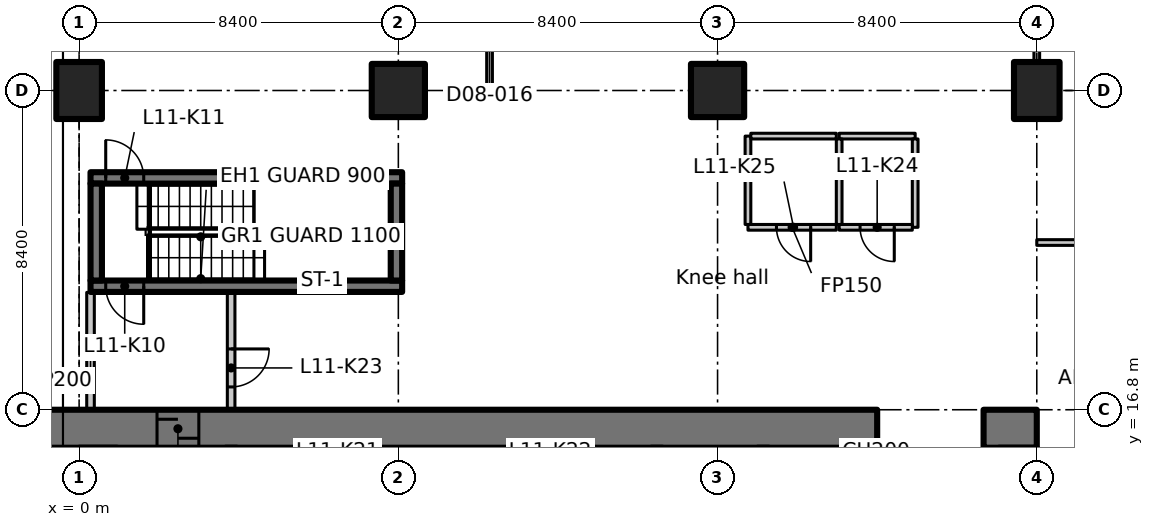
"""IFC4 building model, lengths in metres.
Left out: names, types, materials, properties, quantities, classifications, styles, units other than length and angle.
Written with IfcOpenShell. Run it as: python <this file> out.ifc"""

import sys

from ifc_helpers import new_model, si_unit, direction, frame, frame_2d, origin, origin_2d, place, context, subcontext, project, spatial, polyline, rectangle, outline, extrude, element, fill, save


model = new_model("IFC4")
c1 = context("Model", 3, precision=1e-05, world=origin(), true_north=direction((0.0, 1.0)))
c2 = subcontext(c1, "Body", "Model", "MODEL_VIEW")
j1 = project(units=[si_unit("LENGTHUNIT", "METRE"), si_unit("PLANEANGLEUNIT", "RADIAN")], contexts=[c1])
p1 = place(None, origin())
s1 = spatial("IfcSite", under=j1, at=p1, CompositionType="ELEMENT")
p2 = place(p1, origin())
s2 = spatial("IfcBuilding", under=s1, at=p2, CompositionType="ELEMENT")
p3 = place(p2, frame((0.0, 0.0, 54.5)))
s3 = spatial("IfcBuildingStorey", under=s2, at=p3, CompositionType="ELEMENT", Elevation=54.5)
p4 = place(p3, frame((0.0, 25.2, 0.0), z_axis=(0.0, 0.0, 1.0), x_axis=(1.0, 0.0, 0.0)))
e1 = element("IfcColumn", 1, at=p4, inside=s3, PredefinedType="COLUMN", context=c2, shape_type="SweptSolid", body=[
    extrude(rectangle(XDim=1.2, YDim=1.5, at=origin_2d()), origin(), (0.0, 0.0, 1.0), 3.35),
])
for number, where, z_axis, x_axis in (
    (2, (8.4, 25.2, 0.0), (0.0, 0.0, 1.0), (1.0, 0.0, 0.0)),
    (3, (16.8, 25.2, 0.0), (0.0, 0.0, 1.0), (1.0, 0.0, 0.0)),
):
    element("IfcColumn", number, at=place(p3, frame(where, z_axis=z_axis, x_axis=x_axis)), inside=s3, PredefinedType="COLUMN", context=c2, shape_type="SweptSolid", body=[
        extrude(rectangle(XDim=1.4, YDim=1.4, at=origin_2d()), origin(), (0.0, 0.0, 1.0), 3.35),
    ])
p5 = place(p3, frame((25.2, 25.2, 0.0), z_axis=(0.0, 0.0, 1.0), x_axis=(1.0, 0.0, 0.0)))
e4 = element("IfcColumn", 4, at=p5, inside=s3, PredefinedType="COLUMN", context=c2, shape_type="SweptSolid", body=[
    extrude(rectangle(XDim=1.2, YDim=1.5, at=origin_2d()), origin(), (0.0, 0.0, 1.0), 3.35),
])
p6 = place(p3, frame((-1.1, 16.3, 0.0), z_axis=(0.0, 0.0, 1.0), x_axis=(1.0, 0.0, 0.0)))
e5 = element("IfcWall", 5, at=p6, inside=s3, PredefinedType="SHEAR", context=c2, shape_type="SweptSolid", body=[
    extrude(rectangle(XDim=22.1, YDim=1.0, at=frame_2d((11.05, 0.0))), origin(), (0.0, 0.0, 1.0), 3.35),
])
p7 = place(p6, frame((3.15, 0.0, 0.0)))
e6 = element("IfcOpeningElement", 6, at=p7, cuts=e5, PredefinedType="OPENING", context=c2, shape_type="SweptSolid", body=[
    extrude(rectangle(XDim=1.1, YDim=2.3, at=frame_2d((0.55, 1.15))), frame((0.0, 0.51, 0.0), z_axis=(0.0, -1.0, 0.0), x_axis=(1.0, 0.0, 0.0)), (0.0, 0.0, 1.0), 1.02),
])
p8 = place(p3, frame((23.8, 16.3, 0.0), z_axis=(0.0, 0.0, 1.0), x_axis=(1.0, 0.0, 0.0)))
e7 = element("IfcWall", 7, at=p8, inside=s3, PredefinedType="SHEAR", context=c2, shape_type="SweptSolid", body=[
    extrude(rectangle(XDim=1.4, YDim=1.0, at=frame_2d((0.7, 0.0))), origin(), (0.0, 0.0, 1.0), 3.35),
])
p9 = place(p3, frame((24.7, 12.6, 0.0), z_axis=(0.0, 0.0, 1.0), x_axis=(0.0, 1.0, 0.0)))
e8 = element("IfcWall", 8, at=p9, inside=s3, PredefinedType="SHEAR", context=c2, shape_type="SweptSolid", body=[
    extrude(rectangle(XDim=3.2, YDim=1.0, at=frame_2d((1.6, 0.0))), origin(), (0.0, 0.0, 1.0), 3.35),
])
p10 = place(p3, frame((8.5, 20.05, 0.0), z_axis=(0.0, 0.0, 1.0), x_axis=(-1.0, 0.0, 0.0)))
e9 = element("IfcWall", 9, at=p10, inside=s3, PredefinedType="SHEAR", context=c2, shape_type="SweptSolid", body=[
    extrude(rectangle(XDim=8.2, YDim=0.3, at=frame_2d((4.1, 0.0))), origin(), (0.0, 0.0, 1.0), 3.35),
])
p11 = place(p10, frame((6.8, 0.0, 0.0)))
e10 = element("IfcOpeningElement", 10, at=p11, cuts=e9, PredefinedType="OPENING", context=c2, shape_type="SweptSolid", body=[
    extrude(rectangle(XDim=1.0, YDim=2.1, at=frame_2d((0.5, 1.05))), frame((0.0, 0.16, 0.0), z_axis=(0.0, -1.0, 0.0), x_axis=(1.0, 0.0, 0.0)), (0.0, 0.0, 1.0), 0.32),
])
p12 = place(p3, frame((0.3, 22.9, 0.0), z_axis=(0.0, 0.0, 1.0), x_axis=(1.0, 0.0, 0.0)))
e11 = element("IfcWall", 11, at=p12, inside=s3, PredefinedType="SHEAR", context=c2, shape_type="SweptSolid", body=[
    extrude(rectangle(XDim=8.2, YDim=0.3, at=frame_2d((4.1, 0.0))), origin(), (0.0, 0.0, 1.0), 3.35),
])
p13 = place(p12, frame((0.4, 0.0, 0.0)))
e12 = element("IfcOpeningElement", 12, at=p13, cuts=e11, PredefinedType="OPENING", context=c2, shape_type="SweptSolid", body=[
    extrude(rectangle(XDim=1.0, YDim=2.1, at=frame_2d((0.5, 1.05))), frame((0.0, 0.16, 0.0), z_axis=(0.0, -1.0, 0.0), x_axis=(1.0, 0.0, 0.0)), (0.0, 0.0, 1.0), 0.32),
])
for number, where, z_axis, x_axis in (
    (13, (0.45, 20.2, 0.0), (0.0, 0.0, 1.0), (0.0, 1.0, 0.0)),
    (14, (8.35, 20.2, 0.0), (0.0, 0.0, 1.0), (0.0, 1.0, 0.0)),
):
    element("IfcWall", number, at=place(p3, frame(where, z_axis=z_axis, x_axis=x_axis)), inside=s3, PredefinedType="SHEAR", context=c2, shape_type="SweptSolid", body=[
        extrude(rectangle(XDim=2.55, YDim=0.3, at=frame_2d((1.275, 0.0))), origin(), (0.0, 0.0, 1.0), 3.35),
    ])
p14 = place(p3, frame((0.3, 16.812, 0.0), z_axis=(0.0, 0.0, 1.0), x_axis=(0.0, 1.0, 0.0)))
e15 = element("IfcWall", 15, at=p14, inside=s3, PredefinedType="PARTITIONING", context=c2, shape_type="SweptSolid", body=[
    extrude(rectangle(XDim=3.076, YDim=0.2, at=frame_2d((1.538, 0.0))), origin(), (0.0, 0.0, 1.0), 2.98),
])
p15 = place(p3, frame((4.0, 19.888, 0.0), z_axis=(0.0, 0.0, 1.0), x_axis=(0.0, -1.0, 0.0)))
e16 = element("IfcWall", 16, at=p15, inside=s3, PredefinedType="PARTITIONING", context=c2, shape_type="SweptSolid", body=[
    extrude(rectangle(XDim=3.076, YDim=0.2, at=frame_2d((1.538, 0.0))), origin(), (0.0, 0.0, 1.0), 3.35),
])
p16 = place(p15, frame((1.488, 0.0, 0.0)))
e17 = element("IfcOpeningElement", 17, at=p16, cuts=e16, PredefinedType="OPENING", context=c2, shape_type="SweptSolid", body=[
    extrude(rectangle(XDim=1.0, YDim=2.1, at=frame_2d((0.5, 1.05))), frame((0.0, 0.11, 0.0), z_axis=(0.0, -1.0, 0.0), x_axis=(1.0, 0.0, 0.0)), (0.0, 0.0, 1.0), 0.22),
])
p17 = place(p3, frame((20.0, 24.0, 0.0), z_axis=(0.0, 0.0, 1.0), x_axis=(1.0, 0.0, 0.0)))
e18 = element("IfcWall", 18, at=p17, inside=s3, PredefinedType="PARTITIONING", context=c2, shape_type="SweptSolid", body=[
    extrude(rectangle(XDim=2.0, YDim=0.15, at=frame_2d((1.0, 0.0))), origin(), (0.0, 0.0, 1.0), 3.35),
])
p18 = place(p3, frame((22.0, 23.925, 0.0), z_axis=(0.0, 0.0, 1.0), x_axis=(0.0, -1.0, 0.0)))
e19 = element("IfcWall", 19, at=p18, inside=s3, PredefinedType="PARTITIONING", context=c2, shape_type="SweptSolid", body=[
    extrude(rectangle(XDim=2.325, YDim=0.15, at=frame_2d((1.163, 0.0))), origin(), (0.0, 0.0, 1.0), 3.35),
])
p19 = place(p3, frame((21.925, 21.6, 0.0), z_axis=(0.0, 0.0, 1.0), x_axis=(-1.0, 0.0, 0.0)))
e20 = element("IfcWall", 20, at=p19, inside=s3, PredefinedType="PARTITIONING", context=c2, shape_type="SweptSolid", body=[
    extrude(rectangle(XDim=1.925, YDim=0.15, at=frame_2d((0.962, 0.0))), origin(), (0.0, 0.0, 1.0), 3.35),
])
p20 = place(p19, frame((0.475, 0.0, 0.0)))
e21 = element("IfcOpeningElement", 21, at=p20, cuts=e20, PredefinedType="OPENING", context=c2, shape_type="SweptSolid", body=[
    extrude(rectangle(XDim=0.9, YDim=2.1, at=frame_2d((0.45, 1.05))), frame((0.0, 0.085, 0.0), z_axis=(0.0, -1.0, 0.0), x_axis=(1.0, 0.0, 0.0)), (0.0, 0.0, 1.0), 0.17),
])
p21 = place(p3, frame((20.0, 21.675, 0.0), z_axis=(0.0, 0.0, 1.0), x_axis=(0.0, 1.0, 0.0)))
e22 = element("IfcWall", 22, at=p21, inside=s3, PredefinedType="PARTITIONING", context=c2, shape_type="SweptSolid", body=[
    extrude(rectangle(XDim=2.25, YDim=0.15, at=frame_2d((1.125, 0.0))), origin(), (0.0, 0.0, 1.0), 3.35),
])
p22 = place(p3, frame((19.925, 21.6, 0.0), z_axis=(0.0, 0.0, 1.0), x_axis=(-1.0, 0.0, 0.0)))
e23 = element("IfcWall", 23, at=p22, inside=s3, PredefinedType="PARTITIONING", context=c2, shape_type="SweptSolid", body=[
    extrude(rectangle(XDim=2.325, YDim=0.15, at=frame_2d((1.163, 0.0))), origin(), (0.0, 0.0, 1.0), 3.35),
])
p23 = place(p22, frame((0.675, 0.0, 0.0)))
e24 = element("IfcOpeningElement", 24, at=p23, cuts=e23, PredefinedType="OPENING", context=c2, shape_type="SweptSolid", body=[
    extrude(rectangle(XDim=0.9, YDim=2.1, at=frame_2d((0.45, 1.05))), frame((0.0, 0.085, 0.0), z_axis=(0.0, -1.0, 0.0), x_axis=(1.0, 0.0, 0.0)), (0.0, 0.0, 1.0), 0.17),
])
p24 = place(p3, frame((17.6, 21.675, 0.0), z_axis=(0.0, 0.0, 1.0), x_axis=(0.0, 1.0, 0.0)))
e25 = element("IfcWall", 25, at=p24, inside=s3, PredefinedType="PARTITIONING", context=c2, shape_type="SweptSolid", body=[
    extrude(rectangle(XDim=2.325, YDim=0.15, at=frame_2d((1.163, 0.0))), origin(), (0.0, 0.0, 1.0), 3.35),
])
p25 = place(p3, frame((17.675, 24.0, 0.0), z_axis=(0.0, 0.0, 1.0), x_axis=(1.0, 0.0, 0.0)))
e26 = element("IfcWall", 26, at=p25, inside=s3, PredefinedType="PARTITIONING", context=c2, shape_type="SweptSolid", body=[
    extrude(rectangle(XDim=2.25, YDim=0.15, at=frame_2d((1.125, 0.0))), origin(), (0.0, 0.0, 1.0), 3.35),
])
p26 = place(p3, frame((25.2, 21.2, 0.0), z_axis=(0.0, 0.0, 1.0), x_axis=(1.0, 0.0, 0.0)))
e27 = element("IfcWall", 27, at=p26, inside=s3, PredefinedType="PARTITIONING", context=c2, shape_type="SweptSolid", body=[
    extrude(rectangle(XDim=4.2, YDim=0.15, at=frame_2d((2.1, 0.0))), origin(), (0.0, 0.0, 1.0), 3.33),
])
p27 = place(p3, frame((25.2, 31.0, 0.0), z_axis=(0.0, 0.0, 1.0), x_axis=(0.0, -1.0, 0.0)))
e28 = element("IfcWall", 28, at=p27, inside=s3, PredefinedType="PARTITIONING", context=c2, shape_type="SweptSolid", body=[
    extrude(outline(polyline([(0.0, 0.0), (5.03, 0.0), (5.03, 2.98), (0.0, 2.98), (0.0, 0.0)])), frame((0.0, 0.075, 0.0), z_axis=(0.0, -1.0, 0.0), x_axis=(1.0, 0.0, 0.0)), (0.0, 0.0, 1.0), 0.15),
])
p28 = place(p27, frame((1.83, 0.0, 0.0)))
e29 = element("IfcOpeningElement", 29, at=p28, cuts=e28, PredefinedType="OPENING", context=c2, shape_type="SweptSolid", body=[
    extrude(rectangle(XDim=1.1, YDim=2.1, at=frame_2d((0.55, 1.05))), frame((0.0, 0.085, 0.0), z_axis=(0.0, -1.0, 0.0), x_axis=(1.0, 0.0, 0.0)), (0.0, 0.0, 1.0), 0.17),
])
p29 = place(p3, frame((10.8, 25.2, 0.0), z_axis=(0.0, 0.0, 1.0), x_axis=(0.0, 1.0, 0.0)))
e30 = element("IfcWall", 30, at=p29, inside=s3, PredefinedType="PARTITIONING", context=c2, shape_type="SweptSolid", body=[
    extrude(rectangle(XDim=4.2, YDim=0.15, at=frame_2d((2.1, 0.0))), origin(), (0.0, 0.0, 1.0), 3.33),
])
p30 = place(p29, frame((1.5, 0.0, 0.0)))
e31 = element("IfcOpeningElement", 31, at=p30, cuts=e30, PredefinedType="OPENING", context=c2, shape_type="SweptSolid", body=[
    extrude(rectangle(XDim=1.1, YDim=2.1, at=frame_2d((0.55, 1.05))), frame((0.0, 0.085, 0.0), z_axis=(0.0, -1.0, 0.0), x_axis=(1.0, 0.0, 0.0)), (0.0, 0.0, 1.0), 0.17),
])
p31 = place(p7, origin())
e32 = element("IfcDoor", 32, at=p31, inside=s3, OperationType="SLIDING_TO_LEFT", PredefinedType="DOOR", context=c2, shape_type="SweptSolid", body=[
    extrude(rectangle(XDim=1.1, YDim=2.3, at=frame_2d((0.55, 1.15))), frame((0.0, 0.025, 0.0), z_axis=(0.0, -1.0, 0.0), x_axis=(1.0, 0.0, 0.0)), (0.0, 0.0, 1.0), 0.05),
])
fill(e6, e32)
p32 = place(p11, origin())
e33 = element("IfcDoor", 33, at=p32, inside=s3, OperationType="SINGLE_SWING_LEFT", PredefinedType="DOOR", context=c2, shape_type="SweptSolid", body=[
    extrude(rectangle(XDim=1.0, YDim=2.1, at=frame_2d((0.5, 1.05))), frame((0.0, 0.025, 0.0), z_axis=(0.0, -1.0, 0.0), x_axis=(1.0, 0.0, 0.0)), (0.0, 0.0, 1.0), 0.05),
])
fill(e10, e33)
p33 = place(p13, origin())
e34 = element("IfcDoor", 34, at=p33, inside=s3, OperationType="SINGLE_SWING_RIGHT", PredefinedType="DOOR", context=c2, shape_type="SweptSolid", body=[
    extrude(rectangle(XDim=1.0, YDim=2.1, at=frame_2d((0.5, 1.05))), frame((0.0, 0.025, 0.0), z_axis=(0.0, -1.0, 0.0), x_axis=(1.0, 0.0, 0.0)), (0.0, 0.0, 1.0), 0.05),
])
fill(e12, e34)
p34 = place(p16, origin())
e35 = element("IfcDoor", 35, at=p34, inside=s3, OperationType="SINGLE_SWING_RIGHT", PredefinedType="DOOR", context=c2, shape_type="SweptSolid", body=[
    extrude(rectangle(XDim=1.0, YDim=2.1, at=frame_2d((0.5, 1.05))), frame((0.0, 0.025, 0.0), z_axis=(0.0, -1.0, 0.0), x_axis=(1.0, 0.0, 0.0)), (0.0, 0.0, 1.0), 0.05),
])
fill(e17, e35)
p35 = place(p20, origin())
e36 = element("IfcDoor", 36, at=p35, inside=s3, OperationType="SINGLE_SWING_LEFT", PredefinedType="DOOR", context=c2, shape_type="SweptSolid", body=[
    extrude(rectangle(XDim=0.9, YDim=2.1, at=frame_2d((0.45, 1.05))), frame((0.0, 0.025, 0.0), z_axis=(0.0, -1.0, 0.0), x_axis=(1.0, 0.0, 0.0)), (0.0, 0.0, 1.0), 0.05),
])
fill(e21, e36)
p36 = place(p23, origin())
e37 = element("IfcDoor", 37, at=p36, inside=s3, OperationType="SINGLE_SWING_RIGHT", PredefinedType="DOOR", context=c2, shape_type="SweptSolid", body=[
    extrude(rectangle(XDim=0.9, YDim=2.1, at=frame_2d((0.45, 1.05))), frame((0.0, 0.025, 0.0), z_axis=(0.0, -1.0, 0.0), x_axis=(1.0, 0.0, 0.0)), (0.0, 0.0, 1.0), 0.05),
])
fill(e24, e37)
save(model, sys.argv[1])
